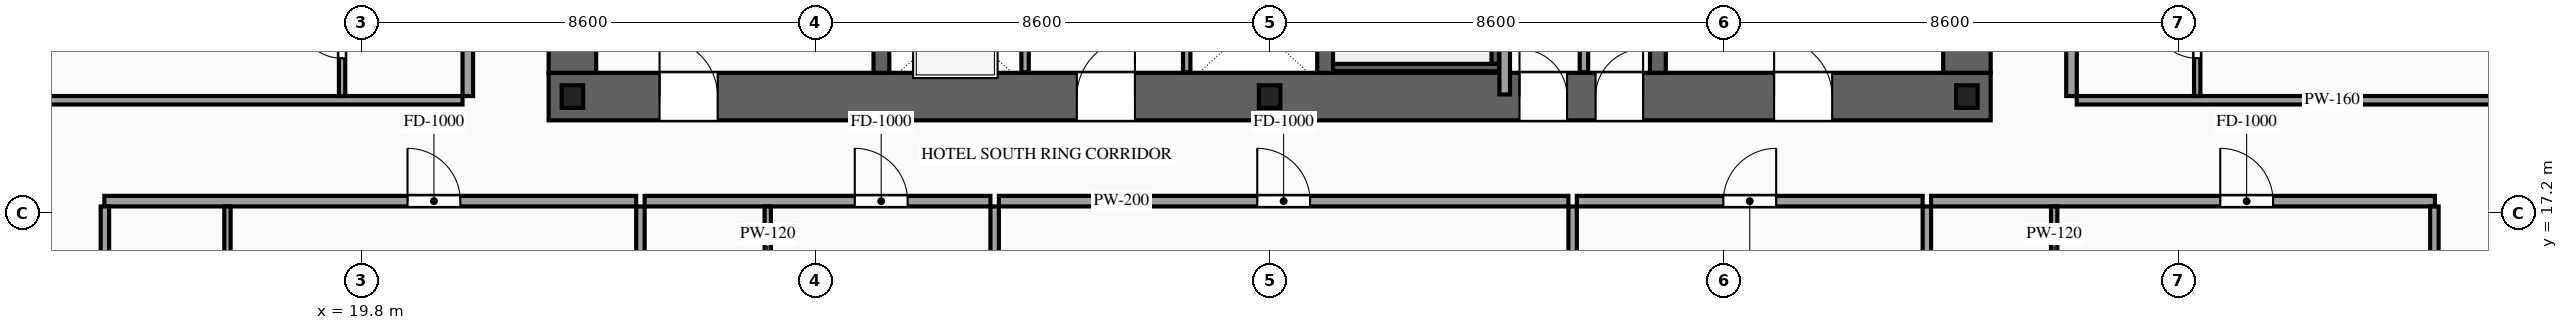
"""IFC4 building model, lengths in metres.
Left out: names, types, materials, properties, quantities, classifications, styles, units other than length and angle.
Written with IfcOpenShell. Run it as: python <this file> out.ifc"""

import sys

from ifc_helpers import new_model, si_unit, direction, frame, frame_2d, origin, origin_2d, place, context, subcontext, project, spatial, rectangle, i_section, extrude, source, transform, mapped, element, fill, save


model = new_model("IFC4")
c1 = context("Model", 3, precision=1e-05, world=origin(), true_north=direction((0.0, 1.0)))
c2 = subcontext(c1, "Body", "Model", "MODEL_VIEW")
j1 = project(units=[si_unit("LENGTHUNIT", "METRE"), si_unit("PLANEANGLEUNIT", "RADIAN")], contexts=[c1])
p1 = place(None, origin())
s1 = spatial("IfcSite", under=j1, at=p1, CompositionType="ELEMENT")
p2 = place(p1, origin())
s2 = spatial("IfcBuilding", under=s1, at=p2, CompositionType="ELEMENT")
p3 = place(p2, frame((0.0, 0.0, 49.6)))
s3 = spatial("IfcBuildingStorey", under=s2, at=p3, CompositionType="ELEMENT", Elevation=49.6)
p4 = place(p3, frame((23.35, 19.4, 0.0), z_axis=(0.0, 0.0, 1.0), x_axis=(1.0, 0.0, 0.0)))
e1 = element("IfcWall", 1, at=p4, inside=s3, PredefinedType="SHEAR", context=c2, shape_type="SweptSolid", body=[
    extrude(rectangle(XDim=27.3, YDim=0.9, at=frame_2d((13.65, 0.0))), origin(), (0.0, 0.0, 1.0), 3.6),
])
p5 = place(p4, frame((2.1, 0.0, 0.0)))
e2 = element("IfcOpeningElement", 2, at=p5, cuts=e1, PredefinedType="OPENING", context=c2, shape_type="SweptSolid", body=[
    extrude(rectangle(XDim=1.1, YDim=2.2, at=frame_2d((0.55, 1.1))), frame((0.0, 0.465, 0.0), z_axis=(0.0, -1.0, 0.0), x_axis=(1.0, 0.0, 0.0)), (0.0, 0.0, 1.0), 0.93),
])
p6 = place(p4, frame((10.0, 0.0, 0.0)))
e3 = element("IfcOpeningElement", 3, at=p6, cuts=e1, PredefinedType="OPENING", context=c2, shape_type="SweptSolid", body=[
    extrude(rectangle(XDim=1.1, YDim=2.2, at=frame_2d((0.55, 1.1))), frame((0.0, 0.465, 0.0), z_axis=(0.0, -1.0, 0.0), x_axis=(1.0, 0.0, 0.0)), (0.0, 0.0, 1.0), 0.93),
])
p7 = place(p4, frame((23.2, 0.0, 0.0)))
e4 = element("IfcOpeningElement", 4, at=p7, cuts=e1, PredefinedType="OPENING", context=c2, shape_type="SweptSolid", body=[
    extrude(rectangle(XDim=1.1, YDim=2.2, at=frame_2d((0.55, 1.1))), frame((0.0, 0.465, 0.0), z_axis=(0.0, -1.0, 0.0), x_axis=(1.0, 0.0, 0.0)), (0.0, 0.0, 1.0), 0.93),
])
p8 = place(p4, frame((19.82, 0.0, 0.0)))
e5 = element("IfcOpeningElement", 5, at=p8, cuts=e1, PredefinedType="OPENING", context=c2, shape_type="SweptSolid", body=[
    extrude(rectangle(XDim=0.9, YDim=2.15, at=frame_2d((0.45, 1.075))), frame((0.0, 0.465, 0.0), z_axis=(0.0, -1.0, 0.0), x_axis=(1.0, 0.0, 0.0)), (0.0, 0.0, 1.0), 0.93),
])
p9 = place(p4, frame((18.38, 0.0, 0.0)))
e6 = element("IfcOpeningElement", 6, at=p9, cuts=e1, PredefinedType="OPENING", context=c2, shape_type="SweptSolid", body=[
    extrude(rectangle(XDim=0.9, YDim=2.15, at=frame_2d((0.45, 1.075))), frame((0.0, 0.465, 0.0), z_axis=(0.0, -1.0, 0.0), x_axis=(1.0, 0.0, 0.0)), (0.0, 0.0, 1.0), 0.93),
])
m1 = source(origin(), c2, "Body", "SweptSolid", [
    extrude(rectangle(XDim=11.9, YDim=0.9, at=frame_2d((5.95, 0.0))), origin(), (0.0, 0.0, 1.0), 3.6),
])
for number, where, z_axis, x_axis in (
    (7, (23.8, 19.85, 0.0), (0.0, 0.0, 1.0), (0.0, 1.0, 0.0)),
    (8, (50.2, 19.85, 0.0), (0.0, 0.0, 1.0), (0.0, 1.0, 0.0)),
):
    element("IfcWall", number, at=place(p3, frame(where, z_axis=z_axis, x_axis=x_axis)), inside=s3, PredefinedType="SHEAR", context=c2, shape_type="MappedRepresentation", body=[
        mapped(m1, transform((0.0, 0.0, 0.0), scale=1.0)),
    ])
m2 = source(origin(), c2, "Body", "SweptSolid", [
    extrude(rectangle(XDim=11.9, YDim=0.3, at=frame_2d((5.95, 0.0))), origin(), (0.0, 0.0, 1.0), 3.6),
])
for number, where, z_axis, x_axis in (
    (9, (29.65, 19.85, 0.0), (0.0, 0.0, 1.0), (0.0, 1.0, 0.0)),
    (10, (38.05, 19.85, 0.0), (0.0, 0.0, 1.0), (0.0, 1.0, 0.0)),
    (11, (44.35, 19.85, 0.0), (0.0, 0.0, 1.0), (0.0, 1.0, 0.0)),
):
    element("IfcWall", number, at=place(p3, frame(where, z_axis=z_axis, x_axis=x_axis)), inside=s3, PredefinedType="SOLIDWALL", context=c2, shape_type="MappedRepresentation", body=[
        mapped(m2, transform((0.0, 0.0, 0.0), scale=1.0)),
    ])
m3 = source(origin(), c2, "Body", "SweptSolid", [
    extrude(i_section(OverallWidth=0.407, OverallDepth=0.428, WebThickness=0.02, FlangeThickness=0.035, at=origin_2d()), origin(), (0.0, 0.0, 1.0), 3.6),
])
for number, where, z_axis, x_axis in (
    (12, (23.8, 19.4, 0.0), (0.0, 0.0, 1.0), (1.0, 0.0, 0.0)),
    (13, (37.0, 19.4, 0.0), (0.0, 0.0, 1.0), (1.0, 0.0, 0.0)),
    (14, (50.2, 19.4, 0.0), (0.0, 0.0, 1.0), (1.0, 0.0, 0.0)),
):
    element("IfcColumn", number, at=place(p3, frame(where, z_axis=z_axis, x_axis=x_axis)), inside=s3, PredefinedType="COLUMN", context=c2, shape_type="MappedRepresentation", body=[
        mapped(m3, transform((0.0, 0.0, 0.0), scale=1.0)),
    ])
p10 = place(p3, frame((32.37, 19.86, 0.0), z_axis=(0.0, 0.0, 1.0), x_axis=(0.0, 1.0, 0.0)))
e15 = element("IfcWall", 15, at=p10, inside=s3, PredefinedType="SOLIDWALL", context=c2, shape_type="SweptSolid", body=[
    extrude(rectangle(XDim=2.04, YDim=0.14, at=frame_2d((1.02, 0.0))), origin(), (0.0, 0.0, 1.0), 3.38),
])
p11 = place(p10, frame((0.47, 0.0, 0.0)))
e16 = element("IfcOpeningElement", 16, at=p11, cuts=e15, PredefinedType="OPENING", context=c2, shape_type="SweptSolid", body=[
    extrude(rectangle(XDim=1.1, YDim=2.2, at=frame_2d((0.55, 1.1))), frame((0.0, 0.085, 0.0), z_axis=(0.0, -1.0, 0.0), x_axis=(1.0, 0.0, 0.0)), (0.0, 0.0, 1.0), 0.17),
])
m4 = source(origin(), c2, "Body", "SweptSolid", [
    extrude(rectangle(XDim=2.04, YDim=0.14, at=frame_2d((1.02, 0.0))), origin(), (0.0, 0.0, 1.0), 3.38),
])
p12 = place(p3, frame((35.43, 19.86, 0.0), z_axis=(0.0, 0.0, 1.0), x_axis=(0.0, 1.0, 0.0)))
e17 = element("IfcWall", 17, at=p12, inside=s3, PredefinedType="SOLIDWALL", context=c2, shape_type="MappedRepresentation", body=[
    mapped(m4, transform((0.0, 0.0, 0.0), scale=1.0)),
])
m5 = source(origin(), c2, "Body", "SweptSolid", [
    extrude(rectangle(XDim=3.14, YDim=0.14, at=frame_2d((1.57, 0.0))), origin(), (0.0, 0.0, 1.0), 3.38),
])
p13 = place(p3, frame((38.2, 19.95, 0.0), z_axis=(0.0, 0.0, 1.0), x_axis=(1.0, 0.0, 0.0)))
e18 = element("IfcWall", 18, at=p13, inside=s3, PredefinedType="SOLIDWALL", context=c2, shape_type="MappedRepresentation", body=[
    mapped(m5, transform((0.0, 0.0, 0.0), scale=1.0)),
])
m6 = source(origin(), c2, "Body", "SweptSolid", [
    extrude(rectangle(XDim=8.94, YDim=0.14, at=frame_2d((4.47, 0.0))), origin(), (0.0, 0.0, 1.0), 3.38),
])
p14 = place(p3, frame((41.27, 20.02, 0.0), z_axis=(0.0, 0.0, 1.0), x_axis=(0.0, 1.0, 0.0)))
e19 = element("IfcWall", 19, at=p14, inside=s3, PredefinedType="SOLIDWALL", context=c2, shape_type="MappedRepresentation", body=[
    mapped(m6, transform((0.0, 0.0, 0.0), scale=1.0)),
])
m7 = source(origin(), c2, "Body", "SweptSolid", [
    extrude(rectangle(XDim=1.34, YDim=0.16, at=frame_2d((0.67, 0.0))), origin(), (0.0, 0.0, 1.0), 3.38),
])
p15 = place(p3, frame((42.95, 19.86, 0.0), z_axis=(0.0, 0.0, 1.0), x_axis=(0.0, 1.0, 0.0)))
e20 = element("IfcWall", 20, at=p15, inside=s3, PredefinedType="PARTITIONING", context=c2, shape_type="MappedRepresentation", body=[
    mapped(m7, transform((0.0, 0.0, 0.0), scale=1.0)),
])
m8 = source(origin(), c2, "Body", "SweptSolid", [
    extrude(rectangle(XDim=6.51, YDim=0.2, at=frame_2d((3.255, 0.0))), origin(), (0.0, 0.0, 1.0), 3.38),
])
p16 = place(p3, frame((41.45, 19.44, 0.0), z_axis=(0.0, 0.0, 1.0), x_axis=(0.0, 1.0, 0.0)))
e21 = element("IfcWall", 21, at=p16, inside=s3, PredefinedType="PARTITIONING", context=c2, shape_type="MappedRepresentation", body=[
    mapped(m8, transform((0.0, 0.0, 0.0), scale=1.0)),
])
p17 = place(p3, frame((14.94, 17.42, 0.0), z_axis=(0.0, 0.0, 1.0), x_axis=(1.0, 0.0, 0.0)))
e22 = element("IfcWall", 22, at=p17, inside=s3, PredefinedType="PARTITIONING", context=c2, shape_type="SweptSolid", body=[
    extrude(rectangle(XDim=10.068, YDim=0.2, at=frame_2d((5.034, 0.0))), origin(), (0.0, 0.0, 1.0), 3.38),
])
p18 = place(p17, frame((5.739, 0.0, 0.0)))
e23 = element("IfcOpeningElement", 23, at=p18, cuts=e22, PredefinedType="OPENING", context=c2, shape_type="SweptSolid", body=[
    extrude(rectangle(XDim=1.0, YDim=2.2, at=frame_2d((0.5, 1.1))), frame((0.0, 0.115, 0.0), z_axis=(0.0, -1.0, 0.0), x_axis=(1.0, 0.0, 0.0)), (0.0, 0.0, 1.0), 0.23),
])
m9 = source(origin(), c2, "Body", "SweptSolid", [
    extrude(rectangle(XDim=16.47, YDim=0.16, at=frame_2d((8.235, 0.0))), origin(), (0.0, 0.0, 1.0), 3.38),
])
p19 = place(p3, frame((25.088, 0.85, 0.0), z_axis=(0.0, 0.0, 1.0), x_axis=(0.0, 1.0, 0.0)))
e24 = element("IfcWall", 24, at=p19, inside=s3, PredefinedType="PARTITIONING", context=c2, shape_type="MappedRepresentation", body=[
    mapped(m9, transform((0.0, 0.0, 0.0), scale=1.0)),
])
m10 = source(origin(), c2, "Body", "SweptSolid", [
    extrude(rectangle(XDim=2.42, YDim=0.12, at=frame_2d((1.21, 0.0))), origin(), (0.0, 0.0, 1.0), 3.38),
])
p20 = place(p3, frame((17.27, 14.9, 0.0), z_axis=(0.0, 0.0, 1.0), x_axis=(0.0, 1.0, 0.0)))
e25 = element("IfcWall", 25, at=p20, inside=s3, PredefinedType="PARTITIONING", context=c2, shape_type="MappedRepresentation", body=[
    mapped(m10, transform((0.0, 0.0, 0.0), scale=1.0)),
])
p21 = place(p3, frame((25.168, 17.42, 0.0), z_axis=(0.0, 0.0, 1.0), x_axis=(1.0, 0.0, 0.0)))
e26 = element("IfcWall", 26, at=p21, inside=s3, PredefinedType="PARTITIONING", context=c2, shape_type="SweptSolid", body=[
    extrude(rectangle(XDim=6.546, YDim=0.2, at=frame_2d((3.273, 0.0))), origin(), (0.0, 0.0, 1.0), 3.38),
])
p22 = place(p21, frame((3.978, 0.0, 0.0)))
e27 = element("IfcOpeningElement", 27, at=p22, cuts=e26, PredefinedType="OPENING", context=c2, shape_type="SweptSolid", body=[
    extrude(rectangle(XDim=1.0, YDim=2.2, at=frame_2d((0.5, 1.1))), frame((0.0, 0.115, 0.0), z_axis=(0.0, -1.0, 0.0), x_axis=(1.0, 0.0, 0.0)), (0.0, 0.0, 1.0), 0.23),
])
p23 = place(p3, frame((31.794, 0.85, 0.0), z_axis=(0.0, 0.0, 1.0), x_axis=(0.0, 1.0, 0.0)))
e28 = element("IfcWall", 28, at=p23, inside=s3, PredefinedType="PARTITIONING", context=c2, shape_type="MappedRepresentation", body=[
    mapped(m9, transform((0.0, 0.0, 0.0), scale=1.0)),
])
p24 = place(p3, frame((27.498, 14.9, 0.0), z_axis=(0.0, 0.0, 1.0), x_axis=(0.0, 1.0, 0.0)))
e29 = element("IfcWall", 29, at=p24, inside=s3, PredefinedType="PARTITIONING", context=c2, shape_type="MappedRepresentation", body=[
    mapped(m10, transform((0.0, 0.0, 0.0), scale=1.0)),
])
p25 = place(p3, frame((31.874, 17.42, 0.0), z_axis=(0.0, 0.0, 1.0), x_axis=(1.0, 0.0, 0.0)))
e30 = element("IfcWall", 30, at=p25, inside=s3, PredefinedType="PARTITIONING", context=c2, shape_type="SweptSolid", body=[
    extrude(rectangle(XDim=10.782, YDim=0.2, at=frame_2d((5.391, 0.0))), origin(), (0.0, 0.0, 1.0), 3.38),
])
p26 = place(p25, frame((4.891, 0.0, 0.0)))
e31 = element("IfcOpeningElement", 31, at=p26, cuts=e30, PredefinedType="OPENING", context=c2, shape_type="SweptSolid", body=[
    extrude(rectangle(XDim=1.0, YDim=2.2, at=frame_2d((0.5, 1.1))), frame((0.0, 0.115, 0.0), z_axis=(0.0, -1.0, 0.0), x_axis=(1.0, 0.0, 0.0)), (0.0, 0.0, 1.0), 0.23),
])
p27 = place(p3, frame((42.736, 0.85, 0.0), z_axis=(0.0, 0.0, 1.0), x_axis=(0.0, 1.0, 0.0)))
e32 = element("IfcWall", 32, at=p27, inside=s3, PredefinedType="PARTITIONING", context=c2, shape_type="MappedRepresentation", body=[
    mapped(m9, transform((0.0, 0.0, 0.0), scale=1.0)),
])
p28 = place(p3, frame((42.816, 17.42, 0.0), z_axis=(0.0, 0.0, 1.0), x_axis=(1.0, 0.0, 0.0)))
e33 = element("IfcWall", 33, at=p28, inside=s3, PredefinedType="PARTITIONING", context=c2, shape_type="SweptSolid", body=[
    extrude(rectangle(XDim=6.546, YDim=0.2, at=frame_2d((3.273, 0.0))), origin(), (0.0, 0.0, 1.0), 3.38),
])
p29 = place(p28, frame((2.773, 0.0, 0.0)))
e34 = element("IfcOpeningElement", 34, at=p29, cuts=e33, PredefinedType="OPENING", context=c2, shape_type="SweptSolid", body=[
    extrude(rectangle(XDim=1.0, YDim=2.2, at=frame_2d((0.5, 1.1))), frame((0.0, 0.115, 0.0), z_axis=(0.0, -1.0, 0.0), x_axis=(1.0, 0.0, 0.0)), (0.0, 0.0, 1.0), 0.23),
])
p30 = place(p3, frame((49.442, 0.85, 0.0), z_axis=(0.0, 0.0, 1.0), x_axis=(0.0, 1.0, 0.0)))
e35 = element("IfcWall", 35, at=p30, inside=s3, PredefinedType="PARTITIONING", context=c2, shape_type="MappedRepresentation", body=[
    mapped(m9, transform((0.0, 0.0, 0.0), scale=1.0)),
])
p31 = place(p3, frame((49.522, 17.42, 0.0), z_axis=(0.0, 0.0, 1.0), x_axis=(1.0, 0.0, 0.0)))
e36 = element("IfcWall", 36, at=p31, inside=s3, PredefinedType="PARTITIONING", context=c2, shape_type="SweptSolid", body=[
    extrude(rectangle(XDim=9.538, YDim=0.2, at=frame_2d((4.769, 0.0))), origin(), (0.0, 0.0, 1.0), 3.38),
])
p32 = place(p31, frame((5.474, 0.0, 0.0)))
e37 = element("IfcOpeningElement", 37, at=p32, cuts=e36, PredefinedType="OPENING", context=c2, shape_type="SweptSolid", body=[
    extrude(rectangle(XDim=1.0, YDim=2.2, at=frame_2d((0.5, 1.1))), frame((0.0, 0.115, 0.0), z_axis=(0.0, -1.0, 0.0), x_axis=(1.0, 0.0, 0.0)), (0.0, 0.0, 1.0), 0.23),
])
m11 = source(origin(), c2, "Body", "SweptSolid", [
    extrude(rectangle(XDim=16.32, YDim=0.16, at=frame_2d((8.16, 0.0))), origin(), (0.0, 0.0, 1.0), 3.38),
])
for number, where, z_axis, x_axis in (
    (38, (14.95, 1.0, 0.0), (0.0, 0.0, 1.0), (0.0, 1.0, 0.0)),
    (39, (59.05, 1.0, 0.0), (0.0, 0.0, 1.0), (0.0, 1.0, 0.0)),
):
    element("IfcWall", number, at=place(p3, frame(where, z_axis=z_axis, x_axis=x_axis)), inside=s3, PredefinedType="PARTITIONING", context=c2, shape_type="MappedRepresentation", body=[
        mapped(m11, transform((0.0, 0.0, 0.0), scale=1.0)),
    ])
p33 = place(p3, frame((51.852, 14.9, 0.0), z_axis=(0.0, 0.0, 1.0), x_axis=(0.0, 1.0, 0.0)))
e40 = element("IfcWall", 40, at=p33, inside=s3, PredefinedType="PARTITIONING", context=c2, shape_type="MappedRepresentation", body=[
    mapped(m10, transform((0.0, 0.0, 0.0), scale=1.0)),
])
p34 = place(p3, frame((21.82, 19.41, 0.0), z_axis=(0.0, 0.0, 1.0), x_axis=(0.0, 1.0, 0.0)))
e41 = element("IfcWall", 41, at=p34, inside=s3, PredefinedType="PARTITIONING", context=c2, shape_type="SweptSolid", body=[
    extrude(rectangle(XDim=6.31, YDim=0.2, at=frame_2d((3.155, 0.0))), origin(), (0.0, 0.0, 1.0), 3.38),
])
p35 = place(p34, frame((3.835, 0.0, 0.0)))
e42 = element("IfcOpeningElement", 42, at=p35, cuts=e41, PredefinedType="OPENING", context=c2, shape_type="SweptSolid", body=[
    extrude(rectangle(XDim=1.0, YDim=2.2, at=frame_2d((0.5, 1.1))), frame((0.0, 0.115, 0.0), z_axis=(0.0, -1.0, 0.0), x_axis=(1.0, 0.0, 0.0)), (0.0, 0.0, 1.0), 0.23),
])
m12 = source(origin(), c2, "Body", "SweptSolid", [
    extrude(rectangle(XDim=9.67, YDim=0.16, at=frame_2d((4.835, 0.0))), origin(), (0.0, 0.0, 1.0), 2.875),
])
p36 = place(p3, frame((12.05, 19.33, 0.0), z_axis=(0.0, 0.0, 1.0), x_axis=(1.0, 0.0, 0.0)))
e43 = element("IfcWall", 43, at=p36, inside=s3, PredefinedType="PARTITIONING", context=c2, shape_type="MappedRepresentation", body=[
    mapped(m12, transform((0.0, 0.0, 0.0), scale=1.0)),
])
p37 = place(p3, frame((19.44, 19.41, 0.0), z_axis=(0.0, 0.0, 1.0), x_axis=(0.0, 1.0, 0.0)))
e44 = element("IfcWall", 44, at=p37, inside=s3, PredefinedType="PARTITIONING", context=c2, shape_type="SweptSolid", body=[
    extrude(rectangle(XDim=2.28, YDim=0.12, at=frame_2d((1.14, 0.0))), origin(), (0.0, 0.0, 1.0), 3.38),
])
p38 = place(p37, frame((0.715, 0.0, 0.0)))
e45 = element("IfcOpeningElement", 45, at=p38, cuts=e44, PredefinedType="OPENING", context=c2, shape_type="SweptSolid", body=[
    extrude(rectangle(XDim=0.85, YDim=2.1, at=frame_2d((0.425, 1.05))), frame((0.0, 0.075, 0.0), z_axis=(0.0, -1.0, 0.0), x_axis=(1.0, 0.0, 0.0)), (0.0, 0.0, 1.0), 0.15),
])
p39 = place(p3, frame((52.18, 19.41, 0.0), z_axis=(0.0, 0.0, 1.0), x_axis=(0.0, 1.0, 0.0)))
e46 = element("IfcWall", 46, at=p39, inside=s3, PredefinedType="PARTITIONING", context=c2, shape_type="SweptSolid", body=[
    extrude(rectangle(XDim=6.31, YDim=0.2, at=frame_2d((3.155, 0.0))), origin(), (0.0, 0.0, 1.0), 3.38),
])
p40 = place(p39, frame((3.835, 0.0, 0.0)))
e47 = element("IfcOpeningElement", 47, at=p40, cuts=e46, PredefinedType="OPENING", context=c2, shape_type="SweptSolid", body=[
    extrude(rectangle(XDim=1.0, YDim=2.2, at=frame_2d((0.5, 1.1))), frame((0.0, 0.115, 0.0), z_axis=(0.0, -1.0, 0.0), x_axis=(1.0, 0.0, 0.0)), (0.0, 0.0, 1.0), 0.23),
])
p41 = place(p3, frame((52.28, 19.33, 0.0), z_axis=(0.0, 0.0, 1.0), x_axis=(1.0, 0.0, 0.0)))
e48 = element("IfcWall", 48, at=p41, inside=s3, PredefinedType="PARTITIONING", context=c2, shape_type="MappedRepresentation", body=[
    mapped(m12, transform((0.0, 0.0, 0.0), scale=1.0)),
])
p42 = place(p3, frame((54.56, 19.41, 0.0), z_axis=(0.0, 0.0, 1.0), x_axis=(0.0, 1.0, 0.0)))
e49 = element("IfcWall", 49, at=p42, inside=s3, PredefinedType="PARTITIONING", context=c2, shape_type="SweptSolid", body=[
    extrude(rectangle(XDim=2.28, YDim=0.12, at=frame_2d((1.14, 0.0))), origin(), (0.0, 0.0, 1.0), 3.38),
])
p43 = place(p42, frame((0.715, 0.0, 0.0)))
e50 = element("IfcOpeningElement", 50, at=p43, cuts=e49, PredefinedType="OPENING", context=c2, shape_type="SweptSolid", body=[
    extrude(rectangle(XDim=0.85, YDim=2.1, at=frame_2d((0.425, 1.05))), frame((0.0, 0.075, 0.0), z_axis=(0.0, -1.0, 0.0), x_axis=(1.0, 0.0, 0.0)), (0.0, 0.0, 1.0), 0.15),
])
m13 = source(origin(), c2, "Body", "SweptSolid", [
    extrude(rectangle(XDim=1.1, YDim=2.2, at=frame_2d((0.55, 1.1))), frame((0.0, 0.025, 0.0), z_axis=(0.0, -1.0, 0.0), x_axis=(1.0, 0.0, 0.0)), (0.0, 0.0, 1.0), 0.05),
])
p44 = place(p5, origin())
e51 = element("IfcDoor", 51, at=p44, inside=s3, OperationType="SINGLE_SWING_LEFT", PredefinedType="DOOR", context=c2, shape_type="MappedRepresentation", body=[
    mapped(m13, transform((0.0, 0.0, 0.0), scale=1.0)),
])
fill(e2, e51)
p45 = place(p6, origin())
e52 = element("IfcDoor", 52, at=p45, inside=s3, OperationType="SINGLE_SWING_RIGHT", PredefinedType="DOOR", context=c2, shape_type="MappedRepresentation", body=[
    mapped(m13, transform((0.0, 0.0, 0.0), scale=1.0)),
])
fill(e3, e52)
p46 = place(p7, origin())
e53 = element("IfcDoor", 53, at=p46, inside=s3, OperationType="SINGLE_SWING_LEFT", PredefinedType="DOOR", context=c2, shape_type="MappedRepresentation", body=[
    mapped(m13, transform((0.0, 0.0, 0.0), scale=1.0)),
])
fill(e4, e53)
m14 = source(origin(), c2, "Body", "SweptSolid", [
    extrude(rectangle(XDim=0.9, YDim=2.15, at=frame_2d((0.45, 1.075))), frame((0.0, 0.025, 0.0), z_axis=(0.0, -1.0, 0.0), x_axis=(1.0, 0.0, 0.0)), (0.0, 0.0, 1.0), 0.05),
])
p47 = place(p8, origin())
e54 = element("IfcDoor", 54, at=p47, inside=s3, OperationType="SINGLE_SWING_RIGHT", PredefinedType="DOOR", context=c2, shape_type="MappedRepresentation", body=[
    mapped(m14, transform((0.0, 0.0, 0.0), scale=1.0)),
])
fill(e5, e54)
p48 = place(p9, origin())
e55 = element("IfcDoor", 55, at=p48, inside=s3, OperationType="SINGLE_SWING_LEFT", PredefinedType="DOOR", context=c2, shape_type="MappedRepresentation", body=[
    mapped(m14, transform((0.0, 0.0, 0.0), scale=1.0)),
])
fill(e6, e55)
m15 = source(origin(), c2, "Body", "SweptSolid", [
    extrude(rectangle(XDim=1.0, YDim=2.2, at=frame_2d((0.5, 1.1))), frame((0.0, 0.025, 0.0), z_axis=(0.0, -1.0, 0.0), x_axis=(1.0, 0.0, 0.0)), (0.0, 0.0, 1.0), 0.05),
])
p49 = place(p18, origin())
e56 = element("IfcDoor", 56, at=p49, inside=s3, OperationType="SINGLE_SWING_LEFT", PredefinedType="DOOR", context=c2, shape_type="MappedRepresentation", body=[
    mapped(m15, transform((0.0, 0.0, 0.0), scale=1.0)),
])
fill(e23, e56)
p50 = place(p22, origin())
e57 = element("IfcDoor", 57, at=p50, inside=s3, OperationType="SINGLE_SWING_LEFT", PredefinedType="DOOR", context=c2, shape_type="MappedRepresentation", body=[
    mapped(m15, transform((0.0, 0.0, 0.0), scale=1.0)),
])
fill(e27, e57)
p51 = place(p26, origin())
e58 = element("IfcDoor", 58, at=p51, inside=s3, OperationType="SINGLE_SWING_LEFT", PredefinedType="DOOR", context=c2, shape_type="MappedRepresentation", body=[
    mapped(m15, transform((0.0, 0.0, 0.0), scale=1.0)),
])
fill(e31, e58)
p52 = place(p29, origin())
e59 = element("IfcDoor", 59, at=p52, inside=s3, OperationType="SINGLE_SWING_RIGHT", PredefinedType="DOOR", context=c2, shape_type="MappedRepresentation", body=[
    mapped(m15, transform((0.0, 0.0, 0.0), scale=1.0)),
])
fill(e34, e59)
p53 = place(p32, origin())
e60 = element("IfcDoor", 60, at=p53, inside=s3, OperationType="SINGLE_SWING_LEFT", PredefinedType="DOOR", context=c2, shape_type="MappedRepresentation", body=[
    mapped(m15, transform((0.0, 0.0, 0.0), scale=1.0)),
])
fill(e37, e60)
m16 = source(origin(), c2, "Body", "SweptSolid", [
    extrude(rectangle(XDim=0.85, YDim=2.1, at=frame_2d((0.425, 1.05))), frame((0.0, 0.025, 0.0), z_axis=(0.0, -1.0, 0.0), x_axis=(1.0, 0.0, 0.0)), (0.0, 0.0, 1.0), 0.05),
])
p54 = place(p38, origin())
e61 = element("IfcDoor", 61, at=p54, inside=s3, OperationType="SINGLE_SWING_RIGHT", PredefinedType="DOOR", context=c2, shape_type="MappedRepresentation", body=[
    mapped(m16, transform((0.0, 0.0, 0.0), scale=1.0)),
])
fill(e45, e61)
p55 = place(p43, origin())
e62 = element("IfcDoor", 62, at=p55, inside=s3, OperationType="SINGLE_SWING_RIGHT", PredefinedType="DOOR", context=c2, shape_type="MappedRepresentation", body=[
    mapped(m16, transform((0.0, 0.0, 0.0), scale=1.0)),
])
fill(e50, e62)
save(model, sys.argv[1])
